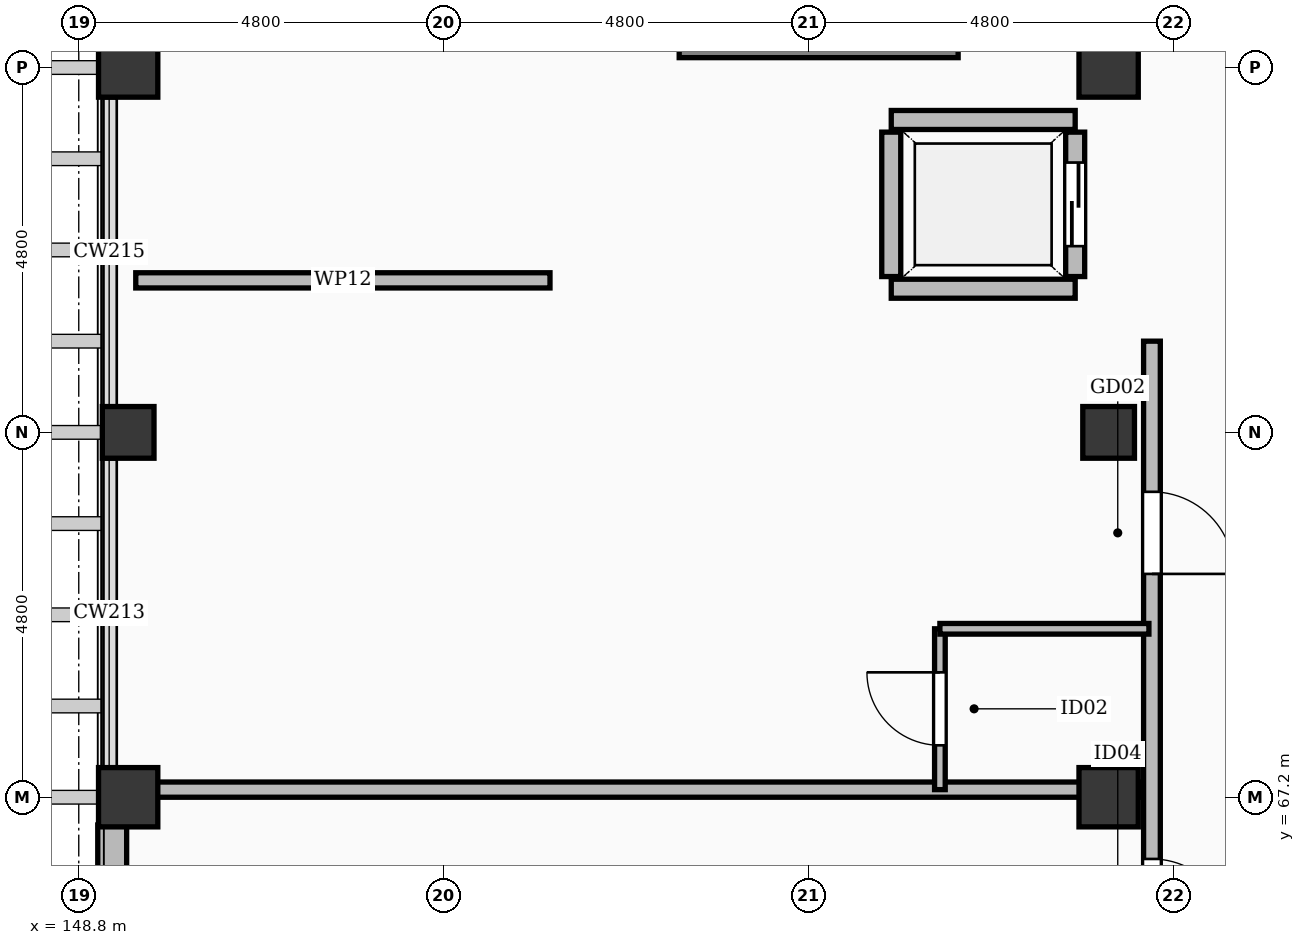
"""IFC4 building model, lengths in metres.
Left out: names, types, materials, properties, quantities, classifications, styles, units other than length and angle.
Written with IfcOpenShell. Run it as: python <this file> out.ifc"""

import sys

from ifc_helpers import new_model, si_unit, direction, frame, frame_2d, origin, origin_2d, place, context, subcontext, project, spatial, rectangle, extrude, element, fill, save


model = new_model("IFC4")
c1 = context("Model", 3, precision=1e-05, world=origin(), true_north=direction((0.0, 1.0)))
c2 = subcontext(c1, "Body", "Model", "MODEL_VIEW")
j1 = project(units=[si_unit("LENGTHUNIT", "METRE"), si_unit("PLANEANGLEUNIT", "RADIAN")], contexts=[c1])
p1 = place(None, origin())
s1 = spatial("IfcSite", under=j1, at=p1, CompositionType="ELEMENT")
p2 = place(p1, origin())
s2 = spatial("IfcBuilding", under=s1, at=p2, CompositionType="ELEMENT")
p3 = place(p2, frame((0.0, 0.0, 24.6)))
s3 = spatial("IfcBuildingStorey", under=s2, at=p3, CompositionType="ELEMENT", Elevation=24.6)
for number, where, z_axis, x_axis in (
    (1, (149.45, 67.2, 0.0), (0.0, 0.0, 1.0), (1.0, 0.0, 0.0)),
    (2, (149.45, 76.8, 0.0), (0.0, 0.0, 1.0), (1.0, 0.0, 0.0)),
    (3, (162.35, 67.2, 0.0), (0.0, 0.0, 1.0), (1.0, 0.0, 0.0)),
    (4, (162.35, 76.8, 0.0), (0.0, 0.0, 1.0), (1.0, 0.0, 0.0)),
):
    element("IfcColumn", number, at=place(p3, frame(where, z_axis=z_axis, x_axis=x_axis)), inside=s3, PredefinedType="COLUMN", context=c2, shape_type="SweptSolid", body=[
        extrude(rectangle(XDim=0.78, YDim=0.78, at=origin_2d()), origin(), (0.0, 0.0, 1.0), 3.6),
    ])
for number, where, z_axis, x_axis in (
    (5, (149.45, 72.0, 0.0), (0.0, 0.0, 1.0), (1.0, 0.0, 0.0)),
    (6, (162.35, 72.0, 0.0), (0.0, 0.0, 1.0), (1.0, 0.0, 0.0)),
):
    element("IfcColumn", number, at=place(p3, frame(where, z_axis=z_axis, x_axis=x_axis)), inside=s3, PredefinedType="COLUMN", context=c2, shape_type="SweptSolid", body=[
        extrude(rectangle(XDim=0.68, YDim=0.68, at=origin_2d()), origin(), (0.0, 0.0, 1.0), 3.6),
    ])
p4 = place(p3, frame((149.24, 62.715, 0.0), z_axis=(0.0, 0.0, 1.0), x_axis=(0.0, 1.0, 0.0)))
e7 = element("IfcWall", 7, at=p4, inside=s3, PredefinedType="SOLIDWALL", context=c2, shape_type="SweptSolid", body=[
    extrude(rectangle(XDim=4.12, YDim=0.38, at=frame_2d((2.06, 0.0))), origin(), (0.0, 0.0, 1.0), 2.632),
])
p5 = place(p4, frame((0.86, 0.0, 0.55)))
e8 = element("IfcOpeningElement", 8, at=p5, cuts=e7, PredefinedType="OPENING", context=c2, shape_type="SweptSolid", body=[
    extrude(rectangle(XDim=2.4, YDim=1.8, at=frame_2d((1.2, 0.9))), frame((0.0, 0.202, 0.0), z_axis=(0.0, -1.0, 0.0), x_axis=(1.0, 0.0, 0.0)), (0.0, 0.0, 1.0), 0.404),
])
p6 = place(p3, frame((156.7, 77.18, 0.0), z_axis=(0.0, 0.0, 1.0), x_axis=(1.0, 0.0, 0.0)))
e9 = element("IfcWall", 9, at=p6, inside=s3, PredefinedType="SHEAR", context=c2, shape_type="SweptSolid", body=[
    extrude(rectangle(XDim=3.67, YDim=0.5, at=frame_2d((1.835, 0.0))), origin(), (0.0, 0.0, 1.0), 3.34),
])
for number, where, z_axis, x_axis in (
    (10, (159.49, 73.89, 0.0), (0.0, 0.0, 1.0), (1.0, 0.0, 0.0)),
    (11, (159.49, 76.11, 0.0), (0.0, 0.0, 1.0), (1.0, 0.0, 0.0)),
):
    element("IfcWall", number, at=place(p3, frame(where, z_axis=z_axis, x_axis=x_axis)), inside=s3, PredefinedType="SOLIDWALL", context=c2, shape_type="SweptSolid", body=[
        extrude(rectangle(XDim=2.42, YDim=0.25, at=frame_2d((1.21, 0.0))), origin(), (0.0, 0.0, 1.0), 3.34),
    ])
p7 = place(p3, frame((159.49, 74.05, 0.0), z_axis=(0.0, 0.0, 1.0), x_axis=(0.0, 1.0, 0.0)))
e12 = element("IfcWall", 12, at=p7, inside=s3, PredefinedType="SOLIDWALL", context=c2, shape_type="SweptSolid", body=[
    extrude(rectangle(XDim=1.9, YDim=0.25, at=frame_2d((0.95, 0.0))), origin(), (0.0, 0.0, 1.0), 3.34),
])
p8 = place(p3, frame((161.91, 74.05, 0.0), z_axis=(0.0, 0.0, 1.0), x_axis=(0.0, 1.0, 0.0)))
e13 = element("IfcWall", 13, at=p8, inside=s3, PredefinedType="SOLIDWALL", context=c2, shape_type="SweptSolid", body=[
    extrude(rectangle(XDim=1.9, YDim=0.25, at=frame_2d((0.95, 0.0))), origin(), (0.0, 0.0, 1.0), 3.34),
])
p9 = place(p8, frame((0.4, 0.0, 0.0)))
e14 = element("IfcOpeningElement", 14, at=p9, cuts=e13, PredefinedType="OPENING", context=c2, shape_type="SweptSolid", body=[
    extrude(rectangle(XDim=1.1, YDim=2.2, at=frame_2d((0.55, 1.1))), frame((0.0, 0.137, 0.0), z_axis=(0.0, -1.0, 0.0), x_axis=(1.0, 0.0, 0.0)), (0.0, 0.0, 1.0), 0.274),
])
p10 = place(p3, frame((162.92, 29.15, 0.0), z_axis=(0.0, 0.0, 1.0), x_axis=(0.0, 1.0, 0.0)))
e15 = element("IfcWall", 15, at=p10, inside=s3, PredefinedType="PARTITIONING", context=c2, shape_type="SweptSolid", body=[
    extrude(rectangle(XDim=44.05, YDim=0.22, at=frame_2d((22.025, 0.0))), origin(), (0.0, 0.0, 1.0), 2.632),
])
p11 = place(p10, frame((5.15, 0.0, 0.0)))
e16 = element("IfcOpeningElement", 16, at=p11, cuts=e15, PredefinedType="OPENING", context=c2, shape_type="SweptSolid", body=[
    extrude(rectangle(XDim=0.98, YDim=2.15, at=frame_2d((0.49, 1.075))), frame((0.0, 0.122, 0.0), z_axis=(0.0, -1.0, 0.0), x_axis=(1.0, 0.0, 0.0)), (0.0, 0.0, 1.0), 0.244),
])
p12 = place(p10, frame((12.188, 0.0, 0.0)))
e17 = element("IfcOpeningElement", 17, at=p12, cuts=e15, PredefinedType="OPENING", context=c2, shape_type="SweptSolid", body=[
    extrude(rectangle(XDim=1.08, YDim=2.25, at=frame_2d((0.54, 1.125))), frame((0.0, 0.122, 0.0), z_axis=(0.0, -1.0, 0.0), x_axis=(1.0, 0.0, 0.0)), (0.0, 0.0, 1.0), 0.244),
])
p13 = place(p10, frame((16.988, 0.0, 0.0)))
e18 = element("IfcOpeningElement", 18, at=p13, cuts=e15, PredefinedType="OPENING", context=c2, shape_type="SweptSolid", body=[
    extrude(rectangle(XDim=1.02, YDim=2.2, at=frame_2d((0.51, 1.1))), frame((0.0, 0.122, 0.0), z_axis=(0.0, -1.0, 0.0), x_axis=(1.0, 0.0, 0.0)), (0.0, 0.0, 1.0), 0.244),
])
p14 = place(p10, frame((21.438, 0.0, 0.0)))
e19 = element("IfcOpeningElement", 19, at=p14, cuts=e15, PredefinedType="OPENING", context=c2, shape_type="SweptSolid", body=[
    extrude(rectangle(XDim=1.5, YDim=2.3, at=frame_2d((0.75, 1.15))), frame((0.0, 0.122, 0.0), z_axis=(0.0, -1.0, 0.0), x_axis=(1.0, 0.0, 0.0)), (0.0, 0.0, 1.0), 0.244),
])
p15 = place(p10, frame((26.588, 0.0, 0.0)))
e20 = element("IfcOpeningElement", 20, at=p15, cuts=e15, PredefinedType="OPENING", context=c2, shape_type="SweptSolid", body=[
    extrude(rectangle(XDim=1.12, YDim=2.15, at=frame_2d((0.56, 1.075))), frame((0.0, 0.122, 0.0), z_axis=(0.0, -1.0, 0.0), x_axis=(1.0, 0.0, 0.0)), (0.0, 0.0, 1.0), 0.244),
])
p16 = place(p10, frame((31.388, 0.0, 0.0)))
e21 = element("IfcOpeningElement", 21, at=p16, cuts=e15, PredefinedType="OPENING", context=c2, shape_type="SweptSolid", body=[
    extrude(rectangle(XDim=1.28, YDim=2.16, at=frame_2d((0.64, 1.08))), frame((0.0, 0.122, 0.0), z_axis=(0.0, -1.0, 0.0), x_axis=(1.0, 0.0, 0.0)), (0.0, 0.0, 1.0), 0.244),
])
p17 = place(p10, frame((36.188, 0.0, 0.0)))
e22 = element("IfcOpeningElement", 22, at=p17, cuts=e15, PredefinedType="OPENING", context=c2, shape_type="SweptSolid", body=[
    extrude(rectangle(XDim=1.05, YDim=2.18, at=frame_2d((0.525, 1.09))), frame((0.0, 0.122, 0.0), z_axis=(0.0, -1.0, 0.0), x_axis=(1.0, 0.0, 0.0)), (0.0, 0.0, 1.0), 0.244),
])
p18 = place(p10, frame((40.988, 0.0, 0.0)))
e23 = element("IfcOpeningElement", 23, at=p18, cuts=e15, PredefinedType="OPENING", context=c2, shape_type="SweptSolid", body=[
    extrude(rectangle(XDim=1.08, YDim=2.25, at=frame_2d((0.54, 1.125))), frame((0.0, 0.122, 0.0), z_axis=(0.0, -1.0, 0.0), x_axis=(1.0, 0.0, 0.0)), (0.0, 0.0, 1.0), 0.244),
])
p19 = place(p3, frame((149.55, 74.0, 0.0), z_axis=(0.0, 0.0, 1.0), x_axis=(1.0, 0.0, 0.0)))
e24 = element("IfcWall", 24, at=p19, inside=s3, PredefinedType="PARTITIONING", context=c2, shape_type="SweptSolid", body=[
    extrude(rectangle(XDim=5.45, YDim=0.2, at=frame_2d((2.725, 0.0))), origin(), (0.0, 0.0, 1.0), 2.632),
])
p20 = place(p3, frame((149.55, 67.3, 0.0), z_axis=(0.0, 0.0, 1.0), x_axis=(1.0, 0.0, 0.0)))
e25 = element("IfcWall", 25, at=p20, inside=s3, PredefinedType="PARTITIONING", context=c2, shape_type="SweptSolid", body=[
    extrude(rectangle(XDim=13.23, YDim=0.2, at=frame_2d((6.615, 0.0))), origin(), (0.0, 0.0, 1.0), 2.632),
])
p21 = place(p3, frame((160.13, 67.3, 0.0), z_axis=(0.0, 0.0, 1.0), x_axis=(0.0, 1.0, 0.0)))
e26 = element("IfcWall", 26, at=p21, inside=s3, PredefinedType="PARTITIONING", context=c2, shape_type="SweptSolid", body=[
    extrude(rectangle(XDim=2.116, YDim=0.14, at=frame_2d((1.058, 0.0))), origin(), (0.0, 0.0, 1.0), 2.632),
])
p22 = place(p21, frame((0.583, 0.0, 0.0)))
e27 = element("IfcOpeningElement", 27, at=p22, cuts=e26, PredefinedType="OPENING", context=c2, shape_type="SweptSolid", body=[
    extrude(rectangle(XDim=0.96, YDim=2.12, at=frame_2d((0.48, 1.06))), frame((0.0, 0.082, 0.0), z_axis=(0.0, -1.0, 0.0), x_axis=(1.0, 0.0, 0.0)), (0.0, 0.0, 1.0), 0.164),
])
p23 = place(p3, frame((160.13, 69.416, 0.0), z_axis=(0.0, 0.0, 1.0), x_axis=(1.0, 0.0, 0.0)))
e28 = element("IfcWall", 28, at=p23, inside=s3, PredefinedType="PARTITIONING", context=c2, shape_type="SweptSolid", body=[
    extrude(rectangle(XDim=2.75, YDim=0.14, at=frame_2d((1.375, 0.0))), origin(), (0.0, 0.0, 1.0), 2.632),
])
p24 = place(p9, origin())
e29 = element("IfcDoor", 29, at=p24, inside=s3, OperationType="SLIDING_TO_LEFT", PredefinedType="DOOR", context=c2, shape_type="SweptSolid", body=[
    extrude(rectangle(XDim=1.1, YDim=2.2, at=frame_2d((0.55, 1.1))), frame((0.0, 0.025, 0.0), z_axis=(0.0, -1.0, 0.0), x_axis=(1.0, 0.0, 0.0)), (0.0, 0.0, 1.0), 0.05),
])
fill(e14, e29)
p25 = place(p17, frame((1.05, 0.0, 0.0), z_axis=(0.0, 0.0, 1.0), x_axis=(-1.0, 0.0, 0.0)))
e30 = element("IfcDoor", 30, at=p25, inside=s3, OperationType="SINGLE_SWING_LEFT", PredefinedType="DOOR", context=c2, shape_type="SweptSolid", body=[
    extrude(rectangle(XDim=1.05, YDim=2.18, at=frame_2d((0.525, 1.09))), frame((0.0, 0.025, 0.0), z_axis=(0.0, -1.0, 0.0), x_axis=(1.0, 0.0, 0.0)), (0.0, 0.0, 1.0), 0.05),
])
fill(e22, e30)
p26 = place(p18, frame((1.08, 0.0, 0.0), z_axis=(0.0, 0.0, 1.0), x_axis=(-1.0, 0.0, 0.0)))
e31 = element("IfcDoor", 31, at=p26, inside=s3, OperationType="SINGLE_SWING_LEFT", PredefinedType="DOOR", context=c2, shape_type="SweptSolid", body=[
    extrude(rectangle(XDim=1.08, YDim=2.25, at=frame_2d((0.54, 1.125))), frame((0.0, 0.025, 0.0), z_axis=(0.0, -1.0, 0.0), x_axis=(1.0, 0.0, 0.0)), (0.0, 0.0, 1.0), 0.05),
])
fill(e23, e31)
p27 = place(p22, origin())
e32 = element("IfcDoor", 32, at=p27, inside=s3, OperationType="SINGLE_SWING_RIGHT", PredefinedType="DOOR", context=c2, shape_type="SweptSolid", body=[
    extrude(rectangle(XDim=0.96, YDim=2.12, at=frame_2d((0.48, 1.06))), frame((0.0, 0.025, 0.0), z_axis=(0.0, -1.0, 0.0), x_axis=(1.0, 0.0, 0.0)), (0.0, 0.0, 1.0), 0.05),
])
fill(e27, e32)
save(model, sys.argv[1])
